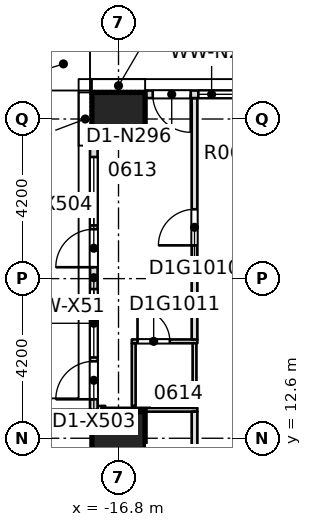
"""IFC4 building model, lengths in metres.
Left out: names, types, materials, properties, quantities, classifications, styles, units other than length and angle.
Written with IfcOpenShell. Run it as: python <this file> out.ifc"""

import sys

from ifc_helpers import new_model, si_unit, direction, frame, frame_2d, origin, origin_2d, place, context, subcontext, project, spatial, rectangle, extrude, element, fill, save


model = new_model("IFC4")
c1 = context("Model", 3, precision=1e-05, world=origin(), true_north=direction((0.0, 1.0)))
c2 = subcontext(c1, "Body", "Model", "MODEL_VIEW")
j1 = project(units=[si_unit("LENGTHUNIT", "METRE"), si_unit("PLANEANGLEUNIT", "RADIAN")], contexts=[c1])
p1 = place(None, origin())
s1 = spatial("IfcSite", under=j1, at=p1, CompositionType="ELEMENT")
p2 = place(p1, origin())
s2 = spatial("IfcBuilding", under=s1, at=p2, CompositionType="ELEMENT")
p3 = place(p2, frame((0.0, 0.0, 34.5)))
s3 = spatial("IfcBuildingStorey", under=s2, at=p3, CompositionType="ELEMENT", Elevation=34.5)
for number, where, z_axis, x_axis in (
    (1, (-16.8, 12.6, -0.32), (0.0, 0.0, 1.0), (1.0, 0.0, 0.0)),
    (2, (-16.8, 21.0, -0.32), (0.0, 0.0, 1.0), (1.0, 0.0, 0.0)),
):
    element("IfcColumn", number, at=place(p3, frame(where, z_axis=z_axis, x_axis=x_axis)), inside=s3, PredefinedType="COLUMN", context=c2, shape_type="SweptSolid", body=[
        extrude(rectangle(XDim=1.4, YDim=1.4, at=origin_2d()), origin(), (0.0, 0.0, 1.0), 3.45),
    ])
p4 = place(p3, frame((-17.35, 13.35, 0.0), z_axis=(0.0, 0.0, 1.0), x_axis=(1.0, 0.0, 0.0)))
e3 = element("IfcWall", 3, at=p4, inside=s3, PredefinedType="PARTITIONING", context=c2, shape_type="SweptSolid", body=[
    extrude(rectangle(XDim=0.2, YDim=0.2, at=frame_2d((0.1, 0.0))), origin(), (0.0, 0.0, 1.0), 3.13),
])
p5 = place(p3, frame((-17.25, 13.35, 0.0), z_axis=(0.0, 0.0, 1.0), x_axis=(1.0, 0.0, 0.0)))
e4 = element("IfcWall", 4, at=p5, inside=s3, PredefinedType="PARTITIONING", context=c2, shape_type="SweptSolid", body=[
    extrude(rectangle(XDim=2.525, YDim=0.1, at=frame_2d((1.262, 0.0))), origin(), (0.0, 0.0, 1.0), 3.13),
])
p6 = place(p3, frame((-16.45, 15.15, 0.0), z_axis=(0.0, 0.0, 1.0), x_axis=(1.0, 0.0, 0.0)))
e5 = element("IfcWall", 5, at=p6, inside=s3, PredefinedType="PARTITIONING", context=c2, shape_type="SweptSolid", body=[
    extrude(rectangle(XDim=1.725, YDim=0.1, at=frame_2d((0.862, 0.0))), origin(), (0.0, 0.0, 1.0), 3.13),
])
p7 = place(p6, frame((0.15, 0.0, 0.0)))
e6 = element("IfcOpeningElement", 6, at=p7, cuts=e5, PredefinedType="OPENING", context=c2, shape_type="SweptSolid", body=[
    extrude(rectangle(XDim=0.85, YDim=2.1, at=frame_2d((0.425, 1.05))), frame((0.0, 0.06, 0.0), z_axis=(0.0, -1.0, 0.0), x_axis=(1.0, 0.0, 0.0)), (0.0, 0.0, 1.0), 0.12),
])
p8 = place(p3, frame((-16.4, 13.45, 0.0), z_axis=(0.0, 0.0, 1.0), x_axis=(0.0, 1.0, 0.0)))
e7 = element("IfcWall", 7, at=p8, inside=s3, PredefinedType="PARTITIONING", context=c2, shape_type="SweptSolid", body=[
    extrude(rectangle(XDim=1.65, YDim=0.1, at=frame_2d((0.825, 0.0))), origin(), (0.0, 0.0, 1.0), 3.13),
])
p9 = place(p3, frame((-14.8, -10.525, 0.0), z_axis=(0.0, 0.0, 1.0), x_axis=(0.0, 1.0, 0.0)))
e8 = element("IfcWall", 8, at=p9, inside=s3, PredefinedType="PARTITIONING", context=c2, shape_type="SweptSolid", body=[
    extrude(rectangle(XDim=23.825, YDim=0.15, at=frame_2d((11.913, 0.0))), origin(), (0.0, 0.0, 1.0), 3.13),
])
p10 = place(p9, frame((0.925, 0.0, 0.0)))
e9 = element("IfcOpeningElement", 9, at=p10, cuts=e8, PredefinedType="OPENING", context=c2, shape_type="SweptSolid", body=[
    extrude(rectangle(XDim=1.0, YDim=2.1, at=frame_2d((0.5, 1.05))), frame((0.0, 0.085, 0.0), z_axis=(0.0, -1.0, 0.0), x_axis=(1.0, 0.0, 0.0)), (0.0, 0.0, 1.0), 0.17),
])
p11 = place(p9, frame((16.065, 0.0, 0.0)))
e10 = element("IfcOpeningElement", 10, at=p11, cuts=e8, PredefinedType="OPENING", context=c2, shape_type="SweptSolid", body=[
    extrude(rectangle(XDim=1.0, YDim=2.1, at=frame_2d((0.5, 1.05))), frame((0.0, 0.085, 0.0), z_axis=(0.0, -1.0, 0.0), x_axis=(1.0, 0.0, 0.0)), (0.0, 0.0, 1.0), 0.17),
])
p12 = place(p9, frame((21.065, 0.0, 0.0)))
e11 = element("IfcOpeningElement", 11, at=p12, cuts=e8, PredefinedType="OPENING", context=c2, shape_type="SweptSolid", body=[
    extrude(rectangle(XDim=0.95, YDim=2.1, at=frame_2d((0.475, 1.05))), frame((0.0, 0.085, 0.0), z_axis=(0.0, -1.0, 0.0), x_axis=(1.0, 0.0, 0.0)), (0.0, 0.0, 1.0), 0.17),
])
p13 = place(p9, frame((9.975, 0.0, 0.0)))
e12 = element("IfcOpeningElement", 12, at=p13, cuts=e8, PredefinedType="OPENING", context=c2, shape_type="SweptSolid", body=[
    extrude(rectangle(XDim=1.1, YDim=2.1, at=frame_2d((0.55, 1.05))), frame((0.0, 0.085, 0.0), z_axis=(0.0, -1.0, 0.0), x_axis=(1.0, 0.0, 0.0)), (0.0, 0.0, 1.0), 0.17),
])
p14 = place(p9, frame((4.725, 0.0, 0.0)))
e13 = element("IfcOpeningElement", 13, at=p14, cuts=e8, PredefinedType="OPENING", context=c2, shape_type="SweptSolid", body=[
    extrude(rectangle(XDim=1.0, YDim=2.1, at=frame_2d((0.5, 1.05))), frame((0.0, 0.085, 0.0), z_axis=(0.0, -1.0, 0.0), x_axis=(1.0, 0.0, 0.0)), (0.0, 0.0, 1.0), 0.17),
])
p15 = place(p3, frame((-14.8, 13.4, 0.0), z_axis=(0.0, 0.0, 1.0), x_axis=(0.0, 1.0, 0.0)))
e14 = element("IfcWall", 14, at=p15, inside=s3, PredefinedType="PARTITIONING", context=c2, shape_type="SweptSolid", body=[
    extrude(rectangle(XDim=1.7, YDim=0.1, at=frame_2d((0.85, 0.0))), origin(), (0.0, 0.0, 1.0), 3.13),
])
p16 = place(p3, frame((-14.8, 15.2, 0.0), z_axis=(0.0, 0.0, 1.0), x_axis=(0.0, 1.0, 0.0)))
e15 = element("IfcWall", 15, at=p16, inside=s3, PredefinedType="PARTITIONING", context=c2, shape_type="SweptSolid", body=[
    extrude(rectangle(XDim=6.35, YDim=0.15, at=frame_2d((3.175, 0.0))), origin(), (0.0, 0.0, 1.0), 3.13),
])
p17 = place(p16, frame((2.475, 0.0, 0.0)))
e16 = element("IfcOpeningElement", 16, at=p17, cuts=e15, PredefinedType="OPENING", context=c2, shape_type="SweptSolid", body=[
    extrude(rectangle(XDim=0.95, YDim=2.1, at=frame_2d((0.475, 1.05))), frame((0.0, 0.085, 0.0), z_axis=(0.0, -1.0, 0.0), x_axis=(1.0, 0.0, 0.0)), (0.0, 0.0, 1.0), 0.17),
])
p18 = place(p3, frame((-12.6, 21.65, 0.0), z_axis=(0.0, 0.0, 1.0), x_axis=(-1.0, 0.0, 0.0)))
e17 = element("IfcWall", 17, at=p18, inside=s3, PredefinedType="STANDARD", context=c2, shape_type="SweptSolid", body=[
    extrude(rectangle(XDim=3.5, YDim=0.2, at=frame_2d((1.75, 0.0))), origin(), (0.0, 0.0, 1.0), 3.13),
])
p19 = place(p18, frame((0.3, 0.0, 0.2)))
e18 = element("IfcOpeningElement", 18, at=p19, cuts=e17, PredefinedType="OPENING", context=c2, shape_type="SweptSolid", body=[
    extrude(rectangle(XDim=1.8, YDim=2.65, at=frame_2d((0.9, 1.325))), frame((0.0, 0.11, 0.0), z_axis=(0.0, -1.0, 0.0), x_axis=(1.0, 0.0, 0.0)), (0.0, 0.0, 1.0), 0.22),
])
p20 = place(p18, frame((2.3, 0.0, 0.0)))
e19 = element("IfcOpeningElement", 19, at=p20, cuts=e17, PredefinedType="OPENING", context=c2, shape_type="SweptSolid", body=[
    extrude(rectangle(XDim=1.0, YDim=2.4, at=frame_2d((0.5, 1.2))), frame((0.0, 0.11, 0.0), z_axis=(0.0, -1.0, 0.0), x_axis=(1.0, 0.0, 0.0)), (0.0, 0.0, 1.0), 0.22),
])
p21 = place(p3, frame((-17.45, 20.3, 0.0), z_axis=(0.0, 0.0, 1.0), x_axis=(0.0, -1.0, 0.0)))
e20 = element("IfcWall", 20, at=p21, inside=s3, PredefinedType="STANDARD", context=c2, shape_type="SweptSolid", body=[
    extrude(rectangle(XDim=6.95, YDim=0.2, at=frame_2d((3.475, 0.0))), origin(), (0.0, 0.0, 1.0), 3.13),
])
p22 = place(p21, frame((3.775, 0.0, 0.2)))
e21 = element("IfcOpeningElement", 21, at=p22, cuts=e20, PredefinedType="OPENING", context=c2, shape_type="SweptSolid", body=[
    extrude(rectangle(XDim=1.8, YDim=2.65, at=frame_2d((0.9, 1.325))), frame((0.0, 0.11, 0.0), z_axis=(0.0, -1.0, 0.0), x_axis=(1.0, 0.0, 0.0)), (0.0, 0.0, 1.0), 0.22),
])
p23 = place(p21, frame((5.675, 0.0, 0.0)))
e22 = element("IfcOpeningElement", 22, at=p23, cuts=e20, PredefinedType="OPENING", context=c2, shape_type="SweptSolid", body=[
    extrude(rectangle(XDim=1.0, YDim=2.4, at=frame_2d((0.5, 1.2))), frame((0.0, 0.11, 0.0), z_axis=(0.0, -1.0, 0.0), x_axis=(1.0, 0.0, 0.0)), (0.0, 0.0, 1.0), 0.22),
])
p24 = place(p21, frame((0.3, 0.0, 0.2)))
e23 = element("IfcOpeningElement", 23, at=p24, cuts=e20, PredefinedType="OPENING", context=c2, shape_type="SweptSolid", body=[
    extrude(rectangle(XDim=1.8, YDim=2.65, at=frame_2d((0.9, 1.325))), frame((0.0, 0.11, 0.0), z_axis=(0.0, -1.0, 0.0), x_axis=(1.0, 0.0, 0.0)), (0.0, 0.0, 1.0), 0.22),
])
p25 = place(p21, frame((2.2, 0.0, 0.0)))
e24 = element("IfcOpeningElement", 24, at=p25, cuts=e20, PredefinedType="OPENING", context=c2, shape_type="SweptSolid", body=[
    extrude(rectangle(XDim=1.0, YDim=2.4, at=frame_2d((0.5, 1.2))), frame((0.0, 0.11, 0.0), z_axis=(0.0, -1.0, 0.0), x_axis=(1.0, 0.0, 0.0)), (0.0, 0.0, 1.0), 0.22),
])
p26 = place(p3, frame((-17.55, 13.25, 0.0), z_axis=(0.0, 0.0, 1.0), x_axis=(-1.0, 0.0, 0.0)))
e25 = element("IfcWall", 25, at=p26, inside=s3, PredefinedType="STANDARD", context=c2, shape_type="SweptSolid", body=[
    extrude(rectangle(XDim=6.95, YDim=0.2, at=frame_2d((3.475, 0.0))), origin(), (0.0, 0.0, 1.0), 3.13),
])
p27 = place(p26, frame((2.975, 0.0, 0.0)))
e26 = element("IfcOpeningElement", 26, at=p27, cuts=e25, PredefinedType="OPENING", context=c2, shape_type="SweptSolid", body=[
    extrude(rectangle(XDim=1.0, YDim=2.4, at=frame_2d((0.5, 1.2))), frame((0.0, 0.11, 0.0), z_axis=(0.0, -1.0, 0.0), x_axis=(1.0, 0.0, 0.0)), (0.0, 0.0, 1.0), 0.22),
])
p28 = place(p17, origin())
e27 = element("IfcDoor", 27, at=p28, inside=s3, OperationType="SINGLE_SWING_RIGHT", PredefinedType="DOOR", context=c2, shape_type="SweptSolid", body=[
    extrude(rectangle(XDim=0.95, YDim=2.1, at=frame_2d((0.475, 1.05))), frame((0.0, 0.025, 0.0), z_axis=(0.0, -1.0, 0.0), x_axis=(1.0, 0.0, 0.0)), (0.0, 0.0, 1.0), 0.05),
])
fill(e16, e27)
p29 = place(p7, origin())
e28 = element("IfcDoor", 28, at=p29, inside=s3, OperationType="SINGLE_SWING_RIGHT", PredefinedType="DOOR", context=c2, shape_type="SweptSolid", body=[
    extrude(rectangle(XDim=0.85, YDim=2.1, at=frame_2d((0.425, 1.05))), frame((0.0, 0.025, 0.0), z_axis=(0.0, -1.0, 0.0), x_axis=(1.0, 0.0, 0.0)), (0.0, 0.0, 1.0), 0.05),
])
fill(e6, e28)
p30 = place(p19, origin())
e29 = element("IfcWindow", 29, at=p30, inside=s3, PartitioningType="SINGLE_PANEL", PredefinedType="WINDOW", context=c2, shape_type="SweptSolid", body=[
    extrude(rectangle(XDim=1.8, YDim=2.65, at=frame_2d((0.9, 1.325))), frame((0.0, 0.03, 0.0), z_axis=(0.0, -1.0, 0.0), x_axis=(1.0, 0.0, 0.0)), (0.0, 0.0, 1.0), 0.06),
])
fill(e18, e29)
p31 = place(p20, origin())
e30 = element("IfcDoor", 30, at=p31, inside=s3, OperationType="SINGLE_SWING_LEFT", PredefinedType="DOOR", context=c2, shape_type="SweptSolid", body=[
    extrude(rectangle(XDim=1.0, YDim=2.4, at=frame_2d((0.5, 1.2))), frame((0.0, 0.025, 0.0), z_axis=(0.0, -1.0, 0.0), x_axis=(1.0, 0.0, 0.0)), (0.0, 0.0, 1.0), 0.05),
])
fill(e19, e30)
p32 = place(p22, origin())
e31 = element("IfcWindow", 31, at=p32, inside=s3, PartitioningType="SINGLE_PANEL", PredefinedType="WINDOW", context=c2, shape_type="SweptSolid", body=[
    extrude(rectangle(XDim=1.8, YDim=2.65, at=frame_2d((0.9, 1.325))), frame((0.0, 0.03, 0.0), z_axis=(0.0, -1.0, 0.0), x_axis=(1.0, 0.0, 0.0)), (0.0, 0.0, 1.0), 0.06),
])
fill(e21, e31)
p33 = place(p23, origin())
e32 = element("IfcDoor", 32, at=p33, inside=s3, OperationType="SINGLE_SWING_LEFT", PredefinedType="DOOR", context=c2, shape_type="SweptSolid", body=[
    extrude(rectangle(XDim=1.0, YDim=2.4, at=frame_2d((0.5, 1.2))), frame((0.0, 0.025, 0.0), z_axis=(0.0, -1.0, 0.0), x_axis=(1.0, 0.0, 0.0)), (0.0, 0.0, 1.0), 0.05),
])
fill(e22, e32)
p34 = place(p24, origin())
e33 = element("IfcWindow", 33, at=p34, inside=s3, PartitioningType="SINGLE_PANEL", PredefinedType="WINDOW", context=c2, shape_type="SweptSolid", body=[
    extrude(rectangle(XDim=1.8, YDim=2.65, at=frame_2d((0.9, 1.325))), frame((0.0, 0.03, 0.0), z_axis=(0.0, -1.0, 0.0), x_axis=(1.0, 0.0, 0.0)), (0.0, 0.0, 1.0), 0.06),
])
fill(e23, e33)
p35 = place(p25, origin())
e34 = element("IfcDoor", 34, at=p35, inside=s3, OperationType="SINGLE_SWING_LEFT", PredefinedType="DOOR", context=c2, shape_type="SweptSolid", body=[
    extrude(rectangle(XDim=1.0, YDim=2.4, at=frame_2d((0.5, 1.2))), frame((0.0, 0.025, 0.0), z_axis=(0.0, -1.0, 0.0), x_axis=(1.0, 0.0, 0.0)), (0.0, 0.0, 1.0), 0.05),
])
fill(e24, e34)
save(model, sys.argv[1])
